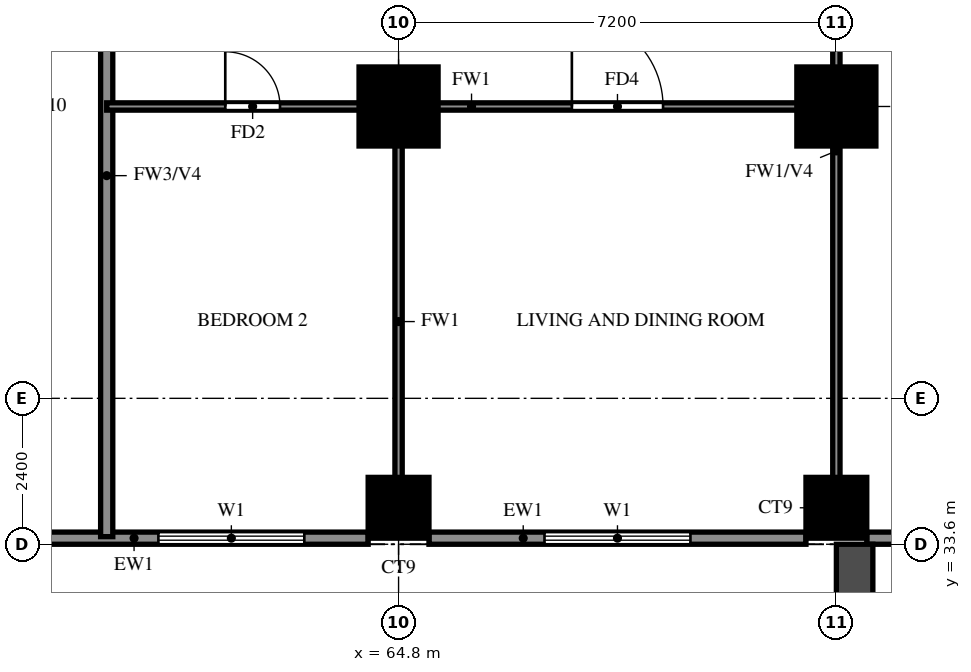
"""IFC4 building model, lengths in metres.
Left out: names, types, materials, properties, quantities, classifications, styles, units other than length and angle.
Written with IfcOpenShell. Run it as: python <this file> out.ifc"""

import sys

from ifc_helpers import new_model, si_unit, direction, frame, frame_2d, origin, origin_2d, place, context, subcontext, project, spatial, rectangle, extrude, source, transform, mapped, element, fill, save


model = new_model("IFC4")
c1 = context("Model", 3, precision=1e-05, world=origin(), true_north=direction((0.0, 1.0)))
c2 = subcontext(c1, "Body", "Model", "MODEL_VIEW")
j1 = project(units=[si_unit("LENGTHUNIT", "METRE"), si_unit("PLANEANGLEUNIT", "RADIAN")], contexts=[c1])
p1 = place(None, origin())
s1 = spatial("IfcSite", under=j1, at=p1, CompositionType="ELEMENT")
p2 = place(p1, origin())
s2 = spatial("IfcBuilding", under=s1, at=p2, CompositionType="ELEMENT")
p3 = place(p2, frame((0.0, 0.0, 83.0)))
s3 = spatial("IfcBuildingStorey", under=s2, at=p3, CompositionType="ELEMENT", Elevation=83.0)
m1 = source(origin(), c2, "Body", "SweptSolid", [
    extrude(rectangle(XDim=1.0, YDim=1.0, at=origin_2d()), origin(), (0.0, 0.0, 1.0), 3.18),
])
for number, where, z_axis, x_axis in (
    (1, (64.8, 34.2, 0.0), (0.0, 0.0, 1.0), (1.0, 0.0, 0.0)),
    (2, (72.0, 34.2, 0.0), (0.0, 0.0, 1.0), (1.0, 0.0, 0.0)),
):
    element("IfcColumn", number, at=place(p3, frame(where, z_axis=z_axis, x_axis=x_axis)), inside=s3, PredefinedType="COLUMN", context=c2, shape_type="MappedRepresentation", body=[
        mapped(m1, transform((0.0, 0.0, 0.0))),
    ])
m2 = source(origin(), c2, "Body", "SweptSolid", [
    extrude(rectangle(XDim=1.3, YDim=1.3, at=origin_2d()), origin(), (0.0, 0.0, 1.0), 3.18),
])
for number, where, z_axis, x_axis in (
    (3, (64.8, 40.8, 0.0), (0.0, 0.0, 1.0), (1.0, 0.0, 0.0)),
    (4, (72.0, 40.8, 0.0), (0.0, 0.0, 1.0), (1.0, 0.0, 0.0)),
):
    element("IfcColumn", number, at=place(p3, frame(where, z_axis=z_axis, x_axis=x_axis)), inside=s3, PredefinedType="COLUMN", context=c2, shape_type="MappedRepresentation", body=[
        mapped(m2, transform((0.0, 0.0, 0.0))),
    ])
p4 = place(p3, frame((85.996, 33.863, 0.0), z_axis=(0.0, 0.0, 1.0), x_axis=(-0.707100718496, 0.707112843825, 0.0)))
e5 = element("IfcWall", 5, at=p4, inside=s3, PredefinedType="SOLIDWALL", context=c2, shape_type="SweptSolid", body=[
    extrude(rectangle(XDim=20.135, YDim=0.2, at=frame_2d((10.067, 0.0))), origin(), (0.0, 0.0, 1.0), 3.18),
])
p5 = place(p3, frame((58.8, 33.7, 0.0), z_axis=(0.0, 0.0, 1.0), x_axis=(1.0, 0.0, 0.0)))
e6 = element("IfcWall", 6, at=p5, inside=s3, PredefinedType="SOLIDWALL", context=c2, shape_type="SweptSolid", body=[
    extrude(rectangle(XDim=5.5, YDim=0.2, at=frame_2d((2.75, 0.0))), origin(), (0.0, 0.0, 1.0), 3.18),
])
p6 = place(p5, frame((2.05, 0.0, 0.6)))
e7 = element("IfcOpeningElement", 7, at=p6, cuts=e6, PredefinedType="OPENING", context=c2, shape_type="SweptSolid", body=[
    extrude(rectangle(XDim=2.4, YDim=2.4, at=frame_2d((1.2, 1.2))), frame((0.0, 0.11, 0.0), z_axis=(0.0, -1.0, 0.0), x_axis=(1.0, 0.0, 0.0)), (0.0, 0.0, 1.0), 0.22),
])
p7 = place(p3, frame((65.3, 33.7, 0.0), z_axis=(0.0, 0.0, 1.0), x_axis=(1.0, 0.0, 0.0)))
e8 = element("IfcWall", 8, at=p7, inside=s3, PredefinedType="SOLIDWALL", context=c2, shape_type="SweptSolid", body=[
    extrude(rectangle(XDim=6.2, YDim=0.2, at=frame_2d((3.1, 0.0))), origin(), (0.0, 0.0, 1.0), 3.18),
])
p8 = place(p7, frame((1.9, 0.0, 0.6)))
e9 = element("IfcOpeningElement", 9, at=p8, cuts=e8, PredefinedType="OPENING", context=c2, shape_type="SweptSolid", body=[
    extrude(rectangle(XDim=2.4, YDim=2.4, at=frame_2d((1.2, 1.2))), frame((0.0, 0.11, 0.0), z_axis=(0.0, -1.0, 0.0), x_axis=(1.0, 0.0, 0.0)), (0.0, 0.0, 1.0), 0.22),
])
p9 = place(p3, frame((72.5, 33.7, 0.0), z_axis=(0.0, 0.0, 1.0), x_axis=(1.0, 0.0, 0.0)))
e10 = element("IfcWall", 10, at=p9, inside=s3, PredefinedType="SOLIDWALL", context=c2, shape_type="SweptSolid", body=[
    extrude(rectangle(XDim=13.659, YDim=0.2, at=frame_2d((6.829, 0.0))), origin(), (0.0, 0.0, 1.0), 3.18),
])
p10 = place(p9, frame((2.2, 0.0, 0.0)))
e11 = element("IfcOpeningElement", 11, at=p10, cuts=e10, PredefinedType="OPENING", context=c2, shape_type="SweptSolid", body=[
    extrude(rectangle(XDim=1.8, YDim=2.4, at=frame_2d((0.9, 1.2))), frame((0.0, 0.11, 0.0), z_axis=(0.0, -1.0, 0.0), x_axis=(1.0, 0.0, 0.0)), (0.0, 0.0, 1.0), 0.22),
])
p11 = place(p9, frame((0.45, 0.0, 0.6)))
e12 = element("IfcOpeningElement", 12, at=p11, cuts=e10, PredefinedType="OPENING", context=c2, shape_type="SweptSolid", body=[
    extrude(rectangle(XDim=1.2, YDim=2.4, at=frame_2d((0.6, 1.2))), frame((0.0, 0.11, 0.0), z_axis=(0.0, -1.0, 0.0), x_axis=(1.0, 0.0, 0.0)), (0.0, 0.0, 1.0), 0.22),
])
p12 = place(p9, frame((4.6, 0.0, 0.6)))
e13 = element("IfcOpeningElement", 13, at=p12, cuts=e10, PredefinedType="OPENING", context=c2, shape_type="SweptSolid", body=[
    extrude(rectangle(XDim=1.2, YDim=2.4, at=frame_2d((0.6, 1.2))), frame((0.0, 0.11, 0.0), z_axis=(0.0, -1.0, 0.0), x_axis=(1.0, 0.0, 0.0)), (0.0, 0.0, 1.0), 0.22),
])
p13 = place(p9, frame((7.386, 0.0, 0.6)))
e14 = element("IfcOpeningElement", 14, at=p13, cuts=e10, PredefinedType="OPENING", context=c2, shape_type="SweptSolid", body=[
    extrude(rectangle(XDim=2.4, YDim=2.4, at=frame_2d((1.2, 1.2))), frame((0.0, 0.11, 0.0), z_axis=(0.0, -1.0, 0.0), x_axis=(1.0, 0.0, 0.0)), (0.0, 0.0, 1.0), 0.22),
])
p14 = place(p9, frame((10.372, 0.0, 0.6)))
e15 = element("IfcOpeningElement", 15, at=p14, cuts=e10, PredefinedType="OPENING", context=c2, shape_type="SweptSolid", body=[
    extrude(rectangle(XDim=2.4, YDim=2.4, at=frame_2d((1.2, 1.2))), frame((0.0, 0.11, 0.0), z_axis=(0.0, -1.0, 0.0), x_axis=(1.0, 0.0, 0.0)), (0.0, 0.0, 1.0), 0.22),
])
p15 = place(p3, frame((72.3, 33.6, 0.0), z_axis=(0.0, 0.0, 1.0), x_axis=(0.0, -1.0, 0.0)))
e16 = element("IfcWall", 16, at=p15, inside=s3, PredefinedType="SOLIDWALL", context=c2, shape_type="SweptSolid", body=[
    extrude(rectangle(XDim=2.7, YDim=0.6, at=frame_2d((1.35, 0.0))), origin(), (0.0, 0.0, 1.0), 2.85),
])
p16 = place(p3, frame((60.0, 33.725, 0.0), z_axis=(0.0, 0.0, 1.0), x_axis=(0.0, 1.0, 0.0)))
e17 = element("IfcWall", 17, at=p16, inside=s3, PredefinedType="SOLIDWALL", context=c2, shape_type="SweptSolid", body=[
    extrude(rectangle(XDim=11.875, YDim=0.2, at=frame_2d((5.938, 0.0))), origin(), (0.0, 0.0, 1.0), 2.28),
])
p17 = place(p3, frame((60.0, 40.8, 0.0), z_axis=(0.0, 0.0, 1.0), x_axis=(1.0, 0.0, 0.0)))
e18 = element("IfcWall", 18, at=p17, inside=s3, PredefinedType="PARTITIONING", context=c2, shape_type="SweptSolid", body=[
    extrude(rectangle(XDim=12.0, YDim=0.12, at=frame_2d((6.0, 0.0))), origin(), (0.0, 0.0, 1.0), 3.18),
])
p18 = place(p17, frame((7.65, 0.0, 0.0)))
e19 = element("IfcOpeningElement", 19, at=p18, cuts=e18, PredefinedType="OPENING", context=c2, shape_type="SweptSolid", body=[
    extrude(rectangle(XDim=1.5, YDim=2.1, at=frame_2d((0.75, 1.05))), frame((0.0, 0.07, 0.0), z_axis=(0.0, -1.0, 0.0), x_axis=(1.0, 0.0, 0.0)), (0.0, 0.0, 1.0), 0.14),
])
p19 = place(p17, frame((1.95, 0.0, 0.0)))
e20 = element("IfcOpeningElement", 20, at=p19, cuts=e18, PredefinedType="OPENING", context=c2, shape_type="SweptSolid", body=[
    extrude(rectangle(XDim=0.9, YDim=2.1, at=frame_2d((0.45, 1.05))), frame((0.0, 0.07, 0.0), z_axis=(0.0, -1.0, 0.0), x_axis=(1.0, 0.0, 0.0)), (0.0, 0.0, 1.0), 0.14),
])
p20 = place(p3, frame((64.8, 33.725, 0.0), z_axis=(0.0, 0.0, 1.0), x_axis=(0.0, 1.0, 0.0)))
e21 = element("IfcWall", 21, at=p20, inside=s3, PredefinedType="PARTITIONING", context=c2, shape_type="SweptSolid", body=[
    extrude(rectangle(XDim=7.075, YDim=0.12, at=frame_2d((3.538, 0.0))), origin(), (0.0, 0.0, 1.0), 3.18),
])
p21 = place(p3, frame((72.0, 33.725, 0.0), z_axis=(0.0, 0.0, 1.0), x_axis=(0.0, 1.0, 0.0)))
e22 = element("IfcWall", 22, at=p21, inside=s3, PredefinedType="PARTITIONING", context=c2, shape_type="SweptSolid", body=[
    extrude(rectangle(XDim=14.098, YDim=0.12, at=frame_2d((7.049, 0.0))), origin(), (0.0, 0.0, 1.0), 2.28),
])
p22 = place(p21, frame((10.075, 0.0, 0.0)))
e23 = element("IfcOpeningElement", 23, at=p22, cuts=e22, PredefinedType="OPENING", context=c2, shape_type="SweptSolid", body=[
    extrude(rectangle(XDim=0.9, YDim=2.1, at=frame_2d((0.45, 1.05))), frame((0.0, 0.07, 0.0), z_axis=(0.0, -1.0, 0.0), x_axis=(1.0, 0.0, 0.0)), (0.0, 0.0, 1.0), 0.14),
])
p23 = place(p6, origin())
e24 = element("IfcWindow", 24, at=p23, inside=s3, PartitioningType="DOUBLE_PANEL_VERTICAL", PredefinedType="WINDOW", context=c2, shape_type="SweptSolid", body=[
    extrude(rectangle(XDim=2.4, YDim=2.4, at=frame_2d((1.2, 1.2))), frame((0.0, 0.03, 0.0), z_axis=(0.0, -1.0, 0.0), x_axis=(1.0, 0.0, 0.0)), (0.0, 0.0, 1.0), 0.06),
])
fill(e7, e24)
p24 = place(p8, origin())
e25 = element("IfcWindow", 25, at=p24, inside=s3, PartitioningType="DOUBLE_PANEL_VERTICAL", PredefinedType="WINDOW", context=c2, shape_type="SweptSolid", body=[
    extrude(rectangle(XDim=2.4, YDim=2.4, at=frame_2d((1.2, 1.2))), frame((0.0, 0.03, 0.0), z_axis=(0.0, -1.0, 0.0), x_axis=(1.0, 0.0, 0.0)), (0.0, 0.0, 1.0), 0.06),
])
fill(e9, e25)
p25 = place(p18, origin())
e26 = element("IfcDoor", 26, at=p25, inside=s3, OperationType="SINGLE_SWING_LEFT", PredefinedType="DOOR", context=c2, shape_type="SweptSolid", body=[
    extrude(rectangle(XDim=1.5, YDim=2.1, at=frame_2d((0.75, 1.05))), frame((0.0, 0.025, 0.0), z_axis=(0.0, -1.0, 0.0), x_axis=(1.0, 0.0, 0.0)), (0.0, 0.0, 1.0), 0.05),
])
fill(e19, e26)
p26 = place(p19, origin())
e27 = element("IfcDoor", 27, at=p26, inside=s3, OperationType="SINGLE_SWING_LEFT", PredefinedType="DOOR", context=c2, shape_type="SweptSolid", body=[
    extrude(rectangle(XDim=0.9, YDim=2.1, at=frame_2d((0.45, 1.05))), frame((0.0, 0.025, 0.0), z_axis=(0.0, -1.0, 0.0), x_axis=(1.0, 0.0, 0.0)), (0.0, 0.0, 1.0), 0.05),
])
fill(e20, e27)
save(model, sys.argv[1])
